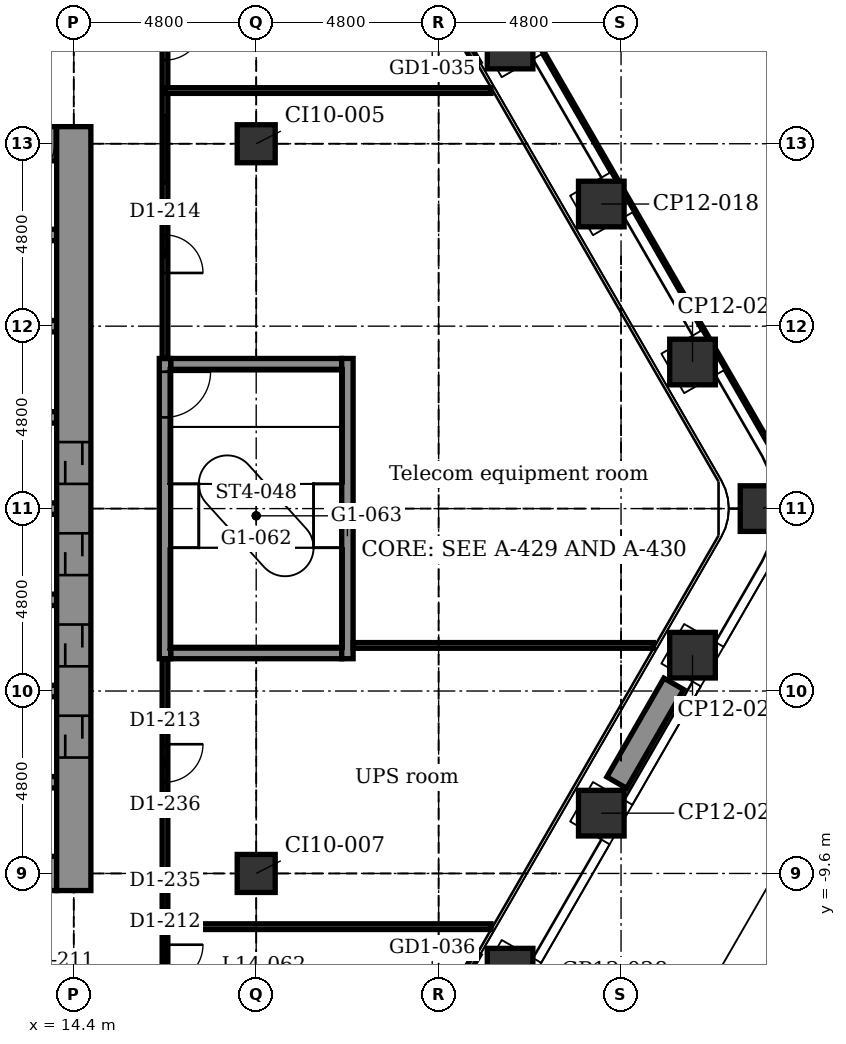
"""IFC4 building model, lengths in metres.
Left out: names, types, materials, properties, quantities, classifications, styles, units other than length and angle.
Written with IfcOpenShell. Run it as: python <this file> out.ifc"""

import sys

from ifc_helpers import new_model, si_unit, direction, frame, frame_2d, origin, origin_2d, place, context, subcontext, project, spatial, rectangle, extrude, element, fill, save


model = new_model("IFC4")
c1 = context("Model", 3, precision=1e-05, world=origin(), true_north=direction((0.0, 1.0)))
c2 = subcontext(c1, "Body", "Model", "MODEL_VIEW")
j1 = project(units=[si_unit("LENGTHUNIT", "METRE"), si_unit("PLANEANGLEUNIT", "RADIAN")], contexts=[c1])
p1 = place(None, origin())
s1 = spatial("IfcSite", under=j1, at=p1, CompositionType="ELEMENT")
p2 = place(p1, origin())
s2 = spatial("IfcBuilding", under=s1, at=p2, CompositionType="ELEMENT")
p3 = place(p2, frame((0.0, 0.0, 77.9)))
s3 = spatial("IfcBuildingStorey", under=s2, at=p3, CompositionType="ELEMENT", Elevation=77.9)
for number, where, z_axis, x_axis in (
    (1, (25.88, 12.171, -0.2), (0.0, 0.0, 1.0), (0.866, 0.5, 0.0)),
    (2, (28.28, 8.014, -0.2), (0.0, 0.0, 1.0), (0.866, 0.5, 0.0)),
    (3, (30.68, 3.857, -0.2), (0.0, 0.0, 1.0), (0.866, 0.5, 0.0)),
    (4, (32.536, 0.0, -0.2), (0.0, 0.0, 1.0), (1.0, 0.0, 0.0)),
    (5, (30.68, -3.857, -0.2), (0.0, 0.0, 1.0), (0.5, 0.866, 0.0)),
    (6, (28.28, -8.014, -0.2), (0.0, 0.0, 1.0), (0.5, 0.866, 0.0)),
    (7, (25.88, -12.171, -0.2), (0.0, 0.0, 1.0), (0.5, 0.866, 0.0)),
):
    element("IfcColumn", number, at=place(p3, frame(where, z_axis=z_axis, x_axis=x_axis)), inside=s3, PredefinedType="COLUMN", context=c2, shape_type="SweptSolid", body=[
        extrude(rectangle(XDim=1.2, YDim=1.2, at=origin_2d()), origin(), (0.0, 0.0, 1.0), 4.5),
    ])
for number, where, z_axis, x_axis in (
    (8, (19.2, -9.6, -0.2), (0.0, 0.0, 1.0), (1.0, 0.0, 0.0)),
    (9, (19.2, 9.6, -0.2), (0.0, 0.0, 1.0), (1.0, 0.0, 0.0)),
):
    element("IfcColumn", number, at=place(p3, frame(where, z_axis=z_axis, x_axis=x_axis)), inside=s3, PredefinedType="COLUMN", context=c2, shape_type="SweptSolid", body=[
        extrude(rectangle(XDim=1.0, YDim=1.0, at=origin_2d()), origin(), (0.0, 0.0, 1.0), 4.5),
    ])
p4 = place(p3, frame((10.05, -9.6, -0.2), z_axis=(0.0, 0.0, 1.0), x_axis=(1.0, 0.0, 0.0)))
e10 = element("IfcWall", 10, at=p4, inside=s3, PredefinedType="SHEAR", context=c2, shape_type="SweptSolid", body=[
    extrude(rectangle(XDim=3.9, YDim=0.9, at=frame_2d((1.95, 0.0))), origin(), (0.0, 0.0, 1.0), 4.5),
])
p5 = place(p4, frame((0.1, 0.0, 0.2)))
e11 = element("IfcOpeningElement", 11, at=p5, cuts=e10, PredefinedType="OPENING", context=c2, shape_type="SweptSolid", body=[
    extrude(rectangle(XDim=0.9, YDim=2.1, at=frame_2d((0.45, 1.05))), frame((0.0, 0.46, 0.0), z_axis=(0.0, -1.0, 0.0), x_axis=(1.0, 0.0, 0.0)), (0.0, 0.0, 1.0), 0.92),
])
p6 = place(p4, frame((2.5, 0.0, 0.2)))
e12 = element("IfcOpeningElement", 12, at=p6, cuts=e10, PredefinedType="OPENING", context=c2, shape_type="SweptSolid", body=[
    extrude(rectangle(XDim=0.9, YDim=2.1, at=frame_2d((0.45, 1.05))), frame((0.0, 0.46, 0.0), z_axis=(0.0, -1.0, 0.0), x_axis=(1.0, 0.0, 0.0)), (0.0, 0.0, 1.0), 0.92),
])
for number, where, z_axis, x_axis in (
    (13, (10.05, -7.2, -0.2), (0.0, 0.0, 1.0), (1.0, 0.0, 0.0)),
    (14, (10.05, -4.8, -0.2), (0.0, 0.0, 1.0), (1.0, 0.0, 0.0)),
):
    element("IfcWall", number, at=place(p3, frame(where, z_axis=z_axis, x_axis=x_axis)), inside=s3, PredefinedType="STANDARD", context=c2, shape_type="SweptSolid", body=[
        extrude(rectangle(XDim=3.9, YDim=0.3, at=frame_2d((1.95, 0.0))), origin(), (0.0, 0.0, 1.0), 4.5),
    ])
p7 = place(p3, frame((16.95, -3.8, -0.2), z_axis=(0.0, 0.0, 1.0), x_axis=(1.0, 0.0, 0.0)))
e15 = element("IfcWall", 15, at=p7, inside=s3, PredefinedType="STANDARD", context=c2, shape_type="SweptSolid", body=[
    extrude(rectangle(XDim=4.5, YDim=0.3, at=frame_2d((2.25, 0.0))), origin(), (0.0, 0.0, 1.0), 4.5),
])
for number, where, z_axis, x_axis in (
    (16, (10.05, -2.4, -0.2), (0.0, 0.0, 1.0), (1.0, 0.0, 0.0)),
    (17, (10.05, 0.0, -0.2), (0.0, 0.0, 1.0), (1.0, 0.0, 0.0)),
    (18, (10.05, 2.4, -0.2), (0.0, 0.0, 1.0), (1.0, 0.0, 0.0)),
):
    element("IfcWall", number, at=place(p3, frame(where, z_axis=z_axis, x_axis=x_axis)), inside=s3, PredefinedType="STANDARD", context=c2, shape_type="SweptSolid", body=[
        extrude(rectangle(XDim=3.9, YDim=0.3, at=frame_2d((1.95, 0.0))), origin(), (0.0, 0.0, 1.0), 4.5),
    ])
p8 = place(p3, frame((16.95, 3.8, -0.2), z_axis=(0.0, 0.0, 1.0), x_axis=(1.0, 0.0, 0.0)))
e19 = element("IfcWall", 19, at=p8, inside=s3, PredefinedType="STANDARD", context=c2, shape_type="SweptSolid", body=[
    extrude(rectangle(XDim=4.5, YDim=0.3, at=frame_2d((2.25, 0.0))), origin(), (0.0, 0.0, 1.0), 4.5),
])
for number, where, z_axis, x_axis in (
    (20, (10.05, 4.8, -0.2), (0.0, 0.0, 1.0), (1.0, 0.0, 0.0)),
    (21, (10.05, 7.2, -0.2), (0.0, 0.0, 1.0), (1.0, 0.0, 0.0)),
):
    element("IfcWall", number, at=place(p3, frame(where, z_axis=z_axis, x_axis=x_axis)), inside=s3, PredefinedType="STANDARD", context=c2, shape_type="SweptSolid", body=[
        extrude(rectangle(XDim=3.9, YDim=0.3, at=frame_2d((1.95, 0.0))), origin(), (0.0, 0.0, 1.0), 4.5),
    ])
p9 = place(p3, frame((10.05, 9.6, -0.2), z_axis=(0.0, 0.0, 1.0), x_axis=(1.0, 0.0, 0.0)))
e22 = element("IfcWall", 22, at=p9, inside=s3, PredefinedType="SHEAR", context=c2, shape_type="SweptSolid", body=[
    extrude(rectangle(XDim=3.9, YDim=0.9, at=frame_2d((1.95, 0.0))), origin(), (0.0, 0.0, 1.0), 4.5),
])
p10 = place(p9, frame((0.05, 0.0, 0.2)))
e23 = element("IfcOpeningElement", 23, at=p10, cuts=e22, PredefinedType="OPENING", context=c2, shape_type="SweptSolid", body=[
    extrude(rectangle(XDim=0.9, YDim=2.1, at=frame_2d((0.45, 1.05))), frame((0.0, 0.46, 0.0), z_axis=(0.0, -1.0, 0.0), x_axis=(1.0, 0.0, 0.0)), (0.0, 0.0, 1.0), 0.92),
])
p11 = place(p9, frame((1.5, 0.0, 0.2)))
e24 = element("IfcOpeningElement", 24, at=p11, cuts=e22, PredefinedType="OPENING", context=c2, shape_type="SweptSolid", body=[
    extrude(rectangle(XDim=0.9, YDim=2.1, at=frame_2d((0.45, 1.05))), frame((0.0, 0.46, 0.0), z_axis=(0.0, -1.0, 0.0), x_axis=(1.0, 0.0, 0.0)), (0.0, 0.0, 1.0), 0.92),
])
p12 = place(p9, frame((2.95, 0.0, 0.2)))
e25 = element("IfcOpeningElement", 25, at=p12, cuts=e22, PredefinedType="OPENING", context=c2, shape_type="SweptSolid", body=[
    extrude(rectangle(XDim=0.9, YDim=2.1, at=frame_2d((0.45, 1.05))), frame((0.0, 0.46, 0.0), z_axis=(0.0, -1.0, 0.0), x_axis=(1.0, 0.0, 0.0)), (0.0, 0.0, 1.0), 0.92),
])
p13 = place(p3, frame((14.4, -10.05, -0.2), z_axis=(0.0, 0.0, 1.0), x_axis=(0.0, 1.0, 0.0)))
e26 = element("IfcWall", 26, at=p13, inside=s3, PredefinedType="SHEAR", context=c2, shape_type="SweptSolid", body=[
    extrude(rectangle(XDim=20.1, YDim=0.9, at=frame_2d((10.05, 0.0))), origin(), (0.0, 0.0, 1.0), 4.5),
])
p14 = place(p13, frame((3.5, 0.0, 0.2)))
e27 = element("IfcOpeningElement", 27, at=p14, cuts=e26, PredefinedType="OPENING", context=c2, shape_type="SweptSolid", body=[
    extrude(rectangle(XDim=1.1, YDim=2.1, at=frame_2d((0.55, 1.05))), frame((0.0, 0.46, 0.0), z_axis=(0.0, -1.0, 0.0), x_axis=(1.0, 0.0, 0.0)), (0.0, 0.0, 1.0), 0.92),
])
p15 = place(p13, frame((5.9, 0.0, 0.2)))
e28 = element("IfcOpeningElement", 28, at=p15, cuts=e26, PredefinedType="OPENING", context=c2, shape_type="SweptSolid", body=[
    extrude(rectangle(XDim=1.1, YDim=2.1, at=frame_2d((0.55, 1.05))), frame((0.0, 0.46, 0.0), z_axis=(0.0, -1.0, 0.0), x_axis=(1.0, 0.0, 0.0)), (0.0, 0.0, 1.0), 0.92),
])
p16 = place(p13, frame((8.3, 0.0, 0.2)))
e29 = element("IfcOpeningElement", 29, at=p16, cuts=e26, PredefinedType="OPENING", context=c2, shape_type="SweptSolid", body=[
    extrude(rectangle(XDim=1.1, YDim=2.1, at=frame_2d((0.55, 1.05))), frame((0.0, 0.46, 0.0), z_axis=(0.0, -1.0, 0.0), x_axis=(1.0, 0.0, 0.0)), (0.0, 0.0, 1.0), 0.92),
])
p17 = place(p13, frame((10.7, 0.0, 0.2)))
e30 = element("IfcOpeningElement", 30, at=p17, cuts=e26, PredefinedType="OPENING", context=c2, shape_type="SweptSolid", body=[
    extrude(rectangle(XDim=1.1, YDim=2.1, at=frame_2d((0.55, 1.05))), frame((0.0, 0.46, 0.0), z_axis=(0.0, -1.0, 0.0), x_axis=(1.0, 0.0, 0.0)), (0.0, 0.0, 1.0), 0.92),
])
p18 = place(p3, frame((16.8, -3.95, -0.2), z_axis=(0.0, 0.0, 1.0), x_axis=(0.0, 1.0, 0.0)))
e31 = element("IfcWall", 31, at=p18, inside=s3, PredefinedType="STANDARD", context=c2, shape_type="SweptSolid", body=[
    extrude(rectangle(XDim=7.9, YDim=0.3, at=frame_2d((3.95, 0.0))), origin(), (0.0, 0.0, 1.0), 4.5),
])
p19 = place(p18, frame((6.35, 0.0, 0.2)))
e32 = element("IfcOpeningElement", 32, at=p19, cuts=e31, PredefinedType="OPENING", context=c2, shape_type="SweptSolid", body=[
    extrude(rectangle(XDim=1.2, YDim=2.1, at=frame_2d((0.6, 1.05))), frame((0.0, 0.16, 0.0), z_axis=(0.0, -1.0, 0.0), x_axis=(1.0, 0.0, 0.0)), (0.0, 0.0, 1.0), 0.32),
])
p20 = place(p3, frame((21.6, -3.95, -0.2), z_axis=(0.0, 0.0, 1.0), x_axis=(0.0, 1.0, 0.0)))
e33 = element("IfcWall", 33, at=p20, inside=s3, PredefinedType="STANDARD", context=c2, shape_type="SweptSolid", body=[
    extrude(rectangle(XDim=7.9, YDim=0.3, at=frame_2d((3.95, 0.0))), origin(), (0.0, 0.0, 1.0), 4.5),
])
p21 = place(p3, frame((22.647, 15.812, 0.0), z_axis=(0.0, 0.0, 1.0), x_axis=(0.499978080042, -0.866038058908, 0.0)))
e34 = element("IfcWall", 34, at=p21, inside=s3, PredefinedType="PARTITIONING", context=c2, shape_type="SweptSolid", body=[
    extrude(rectangle(XDim=4.74, YDim=0.16, at=frame_2d((2.37, 0.0))), origin(), (0.0, 0.0, 1.0), 4.3),
])
p22 = place(p21, frame((1.17, 0.0, 0.0)))
e35 = element("IfcOpeningElement", 35, at=p22, cuts=e34, PredefinedType="OPENING", context=c2, shape_type="SweptSolid", body=[
    extrude(rectangle(XDim=2.4, YDim=2.4, at=frame_2d((1.2, 1.2))), frame((0.0, 0.09, 0.0), z_axis=(0.0, -1.0, 0.0), x_axis=(1.0, 0.0, 0.0)), (0.0, 0.0, 1.0), 0.18),
])
p23 = place(p3, frame((25.017, -11.707, 0.0), z_axis=(0.0, 0.0, 1.0), x_axis=(-0.499978080042, -0.866038058908, 0.0)))
e36 = element("IfcWall", 36, at=p23, inside=s3, PredefinedType="PARTITIONING", context=c2, shape_type="SweptSolid", body=[
    extrude(rectangle(XDim=4.74, YDim=0.16, at=frame_2d((2.37, 0.0))), origin(), (0.0, 0.0, 1.0), 4.3),
])
p24 = place(p23, frame((1.17, 0.0, 0.0)))
e37 = element("IfcOpeningElement", 37, at=p24, cuts=e36, PredefinedType="OPENING", context=c2, shape_type="SweptSolid", body=[
    extrude(rectangle(XDim=2.4, YDim=2.4, at=frame_2d((1.2, 1.2))), frame((0.0, 0.09, 0.0), z_axis=(0.0, -1.0, 0.0), x_axis=(1.0, 0.0, 0.0)), (0.0, 0.0, 1.0), 0.18),
])
p25 = place(p3, frame((30.187, -4.611, 0.0), z_axis=(0.0, 0.0, 1.0), x_axis=(-0.499990139034, -0.866031096941, 0.0)))
e38 = element("IfcWall", 38, at=p25, inside=s3, PredefinedType="USERDEFINED", context=c2, shape_type="SweptSolid", body=[
    extrude(rectangle(XDim=3.0, YDim=0.6, at=frame_2d((1.5, 0.0))), origin(), (0.0, 0.0, 1.0), 0.7),
])
p26 = place(p3, frame((16.8, -13.0, 0.0), z_axis=(0.0, 0.0, 1.0), x_axis=(0.0, 1.0, 0.0)))
e39 = element("IfcWall", 39, at=p26, inside=s3, PredefinedType="PARTITIONING", context=c2, shape_type="SweptSolid", body=[
    extrude(rectangle(XDim=9.05, YDim=0.15, at=frame_2d((4.525, 0.0))), origin(), (0.0, 0.0, 1.0), 4.3),
])
p27 = place(p26, frame((0.525, 0.0, 0.0)))
e40 = element("IfcOpeningElement", 40, at=p27, cuts=e39, PredefinedType="OPENING", context=c2, shape_type="SweptSolid", body=[
    extrude(rectangle(XDim=1.0, YDim=2.1, at=frame_2d((0.5, 1.05))), frame((0.0, 0.085, 0.0), z_axis=(0.0, -1.0, 0.0), x_axis=(1.0, 0.0, 0.0)), (0.0, 0.0, 1.0), 0.17),
])
p28 = place(p26, frame((5.8, 0.0, 0.0)))
e41 = element("IfcOpeningElement", 41, at=p28, cuts=e39, PredefinedType="OPENING", context=c2, shape_type="SweptSolid", body=[
    extrude(rectangle(XDim=1.0, YDim=2.1, at=frame_2d((0.5, 1.05))), frame((0.0, 0.085, 0.0), z_axis=(0.0, -1.0, 0.0), x_axis=(1.0, 0.0, 0.0)), (0.0, 0.0, 1.0), 0.17),
])
p29 = place(p3, frame((16.8, 3.95, 0.0), z_axis=(0.0, 0.0, 1.0), x_axis=(0.0, 1.0, 0.0)))
e42 = element("IfcWall", 42, at=p29, inside=s3, PredefinedType="PARTITIONING", context=c2, shape_type="SweptSolid", body=[
    extrude(rectangle(XDim=9.65, YDim=0.15, at=frame_2d((4.825, 0.0))), origin(), (0.0, 0.0, 1.0), 4.3),
])
p30 = place(p29, frame((2.25, 0.0, 0.0)))
e43 = element("IfcOpeningElement", 43, at=p30, cuts=e42, PredefinedType="OPENING", context=c2, shape_type="SweptSolid", body=[
    extrude(rectangle(XDim=1.0, YDim=2.1, at=frame_2d((0.5, 1.05))), frame((0.0, 0.085, 0.0), z_axis=(0.0, -1.0, 0.0), x_axis=(1.0, 0.0, 0.0)), (0.0, 0.0, 1.0), 0.17),
])
p31 = place(p29, frame((7.85, 0.0, 0.0)))
e44 = element("IfcOpeningElement", 44, at=p31, cuts=e42, PredefinedType="OPENING", context=c2, shape_type="SweptSolid", body=[
    extrude(rectangle(XDim=1.0, YDim=2.1, at=frame_2d((0.5, 1.05))), frame((0.0, 0.085, 0.0), z_axis=(0.0, -1.0, 0.0), x_axis=(1.0, 0.0, 0.0)), (0.0, 0.0, 1.0), 0.17),
])
p32 = place(p29, frame((4.6, 0.0, 0.9)))
e45 = element("IfcOpeningElement", 45, at=p32, cuts=e42, PredefinedType="OPENING", context=c2, shape_type="SweptSolid", body=[
    extrude(rectangle(XDim=1.8, YDim=1.5, at=frame_2d((0.9, 0.75))), frame((0.0, 0.085, 0.0), z_axis=(0.0, -1.0, 0.0), x_axis=(1.0, 0.0, 0.0)), (0.0, 0.0, 1.0), 0.17),
])
p33 = place(p3, frame((16.8, -11.0, 0.0), z_axis=(0.0, 0.0, 1.0), x_axis=(1.0, 0.0, 0.0)))
e46 = element("IfcWall", 46, at=p33, inside=s3, PredefinedType="PARTITIONING", context=c2, shape_type="SweptSolid", body=[
    extrude(rectangle(XDim=8.578, YDim=0.15, at=frame_2d((4.289, 0.0))), origin(), (0.0, 0.0, 1.0), 4.3),
])
p34 = place(p3, frame((21.75, -3.6, 0.0), z_axis=(0.0, 0.0, 1.0), x_axis=(1.0, 0.0, 0.0)))
e47 = element("IfcWall", 47, at=p34, inside=s3, PredefinedType="PARTITIONING", context=c2, shape_type="SweptSolid", body=[
    extrude(rectangle(XDim=7.901, YDim=0.15, at=frame_2d((3.95, 0.0))), origin(), (0.0, 0.0, 1.0), 4.3),
])
p35 = place(p3, frame((16.8, 11.0, 0.0), z_axis=(0.0, 0.0, 1.0), x_axis=(1.0, 0.0, 0.0)))
e48 = element("IfcWall", 48, at=p35, inside=s3, PredefinedType="PARTITIONING", context=c2, shape_type="SweptSolid", body=[
    extrude(rectangle(XDim=8.578, YDim=0.15, at=frame_2d((4.289, 0.0))), origin(), (0.0, 0.0, 1.0), 4.3),
])
p36 = place(p27, frame((1.0, 0.0, 0.0), z_axis=(0.0, 0.0, 1.0), x_axis=(-1.0, 0.0, 0.0)))
e49 = element("IfcDoor", 49, at=p36, inside=s3, OperationType="SINGLE_SWING_RIGHT", PredefinedType="DOOR", context=c2, shape_type="SweptSolid", body=[
    extrude(rectangle(XDim=1.0, YDim=2.1, at=frame_2d((0.5, 1.05))), frame((0.0, 0.025, 0.0), z_axis=(0.0, -1.0, 0.0), x_axis=(1.0, 0.0, 0.0)), (0.0, 0.0, 1.0), 0.05),
])
fill(e40, e49)
p37 = place(p28, frame((1.0, 0.0, 0.0), z_axis=(0.0, 0.0, 1.0), x_axis=(-1.0, 0.0, 0.0)))
e50 = element("IfcDoor", 50, at=p37, inside=s3, OperationType="SINGLE_SWING_RIGHT", PredefinedType="DOOR", context=c2, shape_type="SweptSolid", body=[
    extrude(rectangle(XDim=1.0, YDim=2.1, at=frame_2d((0.5, 1.05))), frame((0.0, 0.025, 0.0), z_axis=(0.0, -1.0, 0.0), x_axis=(1.0, 0.0, 0.0)), (0.0, 0.0, 1.0), 0.05),
])
fill(e41, e50)
p38 = place(p30, frame((1.0, 0.0, 0.0), z_axis=(0.0, 0.0, 1.0), x_axis=(-1.0, 0.0, 0.0)))
e51 = element("IfcDoor", 51, at=p38, inside=s3, OperationType="SINGLE_SWING_LEFT", PredefinedType="DOOR", context=c2, shape_type="SweptSolid", body=[
    extrude(rectangle(XDim=1.0, YDim=2.1, at=frame_2d((0.5, 1.05))), frame((0.0, 0.025, 0.0), z_axis=(0.0, -1.0, 0.0), x_axis=(1.0, 0.0, 0.0)), (0.0, 0.0, 1.0), 0.05),
])
fill(e43, e51)
p39 = place(p31, frame((1.0, 0.0, 0.0), z_axis=(0.0, 0.0, 1.0), x_axis=(-1.0, 0.0, 0.0)))
e52 = element("IfcDoor", 52, at=p39, inside=s3, OperationType="SINGLE_SWING_RIGHT", PredefinedType="DOOR", context=c2, shape_type="SweptSolid", body=[
    extrude(rectangle(XDim=1.0, YDim=2.1, at=frame_2d((0.5, 1.05))), frame((0.0, 0.025, 0.0), z_axis=(0.0, -1.0, 0.0), x_axis=(1.0, 0.0, 0.0)), (0.0, 0.0, 1.0), 0.05),
])
fill(e44, e52)
p40 = place(p14, origin())
e53 = element("IfcDoor", 53, at=p40, inside=s3, OperationType="DOUBLE_DOOR_SLIDING", PredefinedType="DOOR", context=c2, shape_type="SweptSolid", body=[
    extrude(rectangle(XDim=1.1, YDim=2.1, at=frame_2d((0.55, 1.05))), frame((0.0, 0.025, 0.0), z_axis=(0.0, -1.0, 0.0), x_axis=(1.0, 0.0, 0.0)), (0.0, 0.0, 1.0), 0.05),
])
fill(e27, e53)
p41 = place(p15, origin())
e54 = element("IfcDoor", 54, at=p41, inside=s3, OperationType="DOUBLE_DOOR_SLIDING", PredefinedType="DOOR", context=c2, shape_type="SweptSolid", body=[
    extrude(rectangle(XDim=1.1, YDim=2.1, at=frame_2d((0.55, 1.05))), frame((0.0, 0.025, 0.0), z_axis=(0.0, -1.0, 0.0), x_axis=(1.0, 0.0, 0.0)), (0.0, 0.0, 1.0), 0.05),
])
fill(e28, e54)
p42 = place(p16, origin())
e55 = element("IfcDoor", 55, at=p42, inside=s3, OperationType="DOUBLE_DOOR_SLIDING", PredefinedType="DOOR", context=c2, shape_type="SweptSolid", body=[
    extrude(rectangle(XDim=1.1, YDim=2.1, at=frame_2d((0.55, 1.05))), frame((0.0, 0.025, 0.0), z_axis=(0.0, -1.0, 0.0), x_axis=(1.0, 0.0, 0.0)), (0.0, 0.0, 1.0), 0.05),
])
fill(e29, e55)
p43 = place(p17, origin())
e56 = element("IfcDoor", 56, at=p43, inside=s3, OperationType="DOUBLE_DOOR_SLIDING", PredefinedType="DOOR", context=c2, shape_type="SweptSolid", body=[
    extrude(rectangle(XDim=1.1, YDim=2.1, at=frame_2d((0.55, 1.05))), frame((0.0, 0.025, 0.0), z_axis=(0.0, -1.0, 0.0), x_axis=(1.0, 0.0, 0.0)), (0.0, 0.0, 1.0), 0.05),
])
fill(e30, e56)
p44 = place(p19, frame((1.2, 0.0, 0.0), z_axis=(0.0, 0.0, 1.0), x_axis=(-1.0, 0.0, 0.0)))
e57 = element("IfcDoor", 57, at=p44, inside=s3, OperationType="SINGLE_SWING_RIGHT", PredefinedType="DOOR", context=c2, shape_type="SweptSolid", body=[
    extrude(rectangle(XDim=1.2, YDim=2.1, at=frame_2d((0.6, 1.05))), frame((0.0, 0.025, 0.0), z_axis=(0.0, -1.0, 0.0), x_axis=(1.0, 0.0, 0.0)), (0.0, 0.0, 1.0), 0.05),
])
fill(e32, e57)
p45 = place(p12, frame((0.9, 0.0, 0.0), z_axis=(0.0, 0.0, 1.0), x_axis=(-1.0, 0.0, 0.0)))
e58 = element("IfcDoor", 58, at=p45, inside=s3, OperationType="SINGLE_SWING_LEFT", PredefinedType="DOOR", context=c2, shape_type="SweptSolid", body=[
    extrude(rectangle(XDim=0.9, YDim=2.1, at=frame_2d((0.45, 1.05))), frame((0.0, 0.025, 0.0), z_axis=(0.0, -1.0, 0.0), x_axis=(1.0, 0.0, 0.0)), (0.0, 0.0, 1.0), 0.05),
])
fill(e25, e58)
p46 = place(p32, origin())
e59 = element("IfcWindow", 59, at=p46, inside=s3, PartitioningType="SINGLE_PANEL", PredefinedType="WINDOW", context=c2, shape_type="SweptSolid", body=[
    extrude(rectangle(XDim=1.8, YDim=1.5, at=frame_2d((0.9, 0.75))), frame((0.0, 0.03, 0.0), z_axis=(0.0, -1.0, 0.0), x_axis=(1.0, 0.0, 0.0)), (0.0, 0.0, 1.0), 0.06),
])
fill(e45, e59)
save(model, sys.argv[1])
